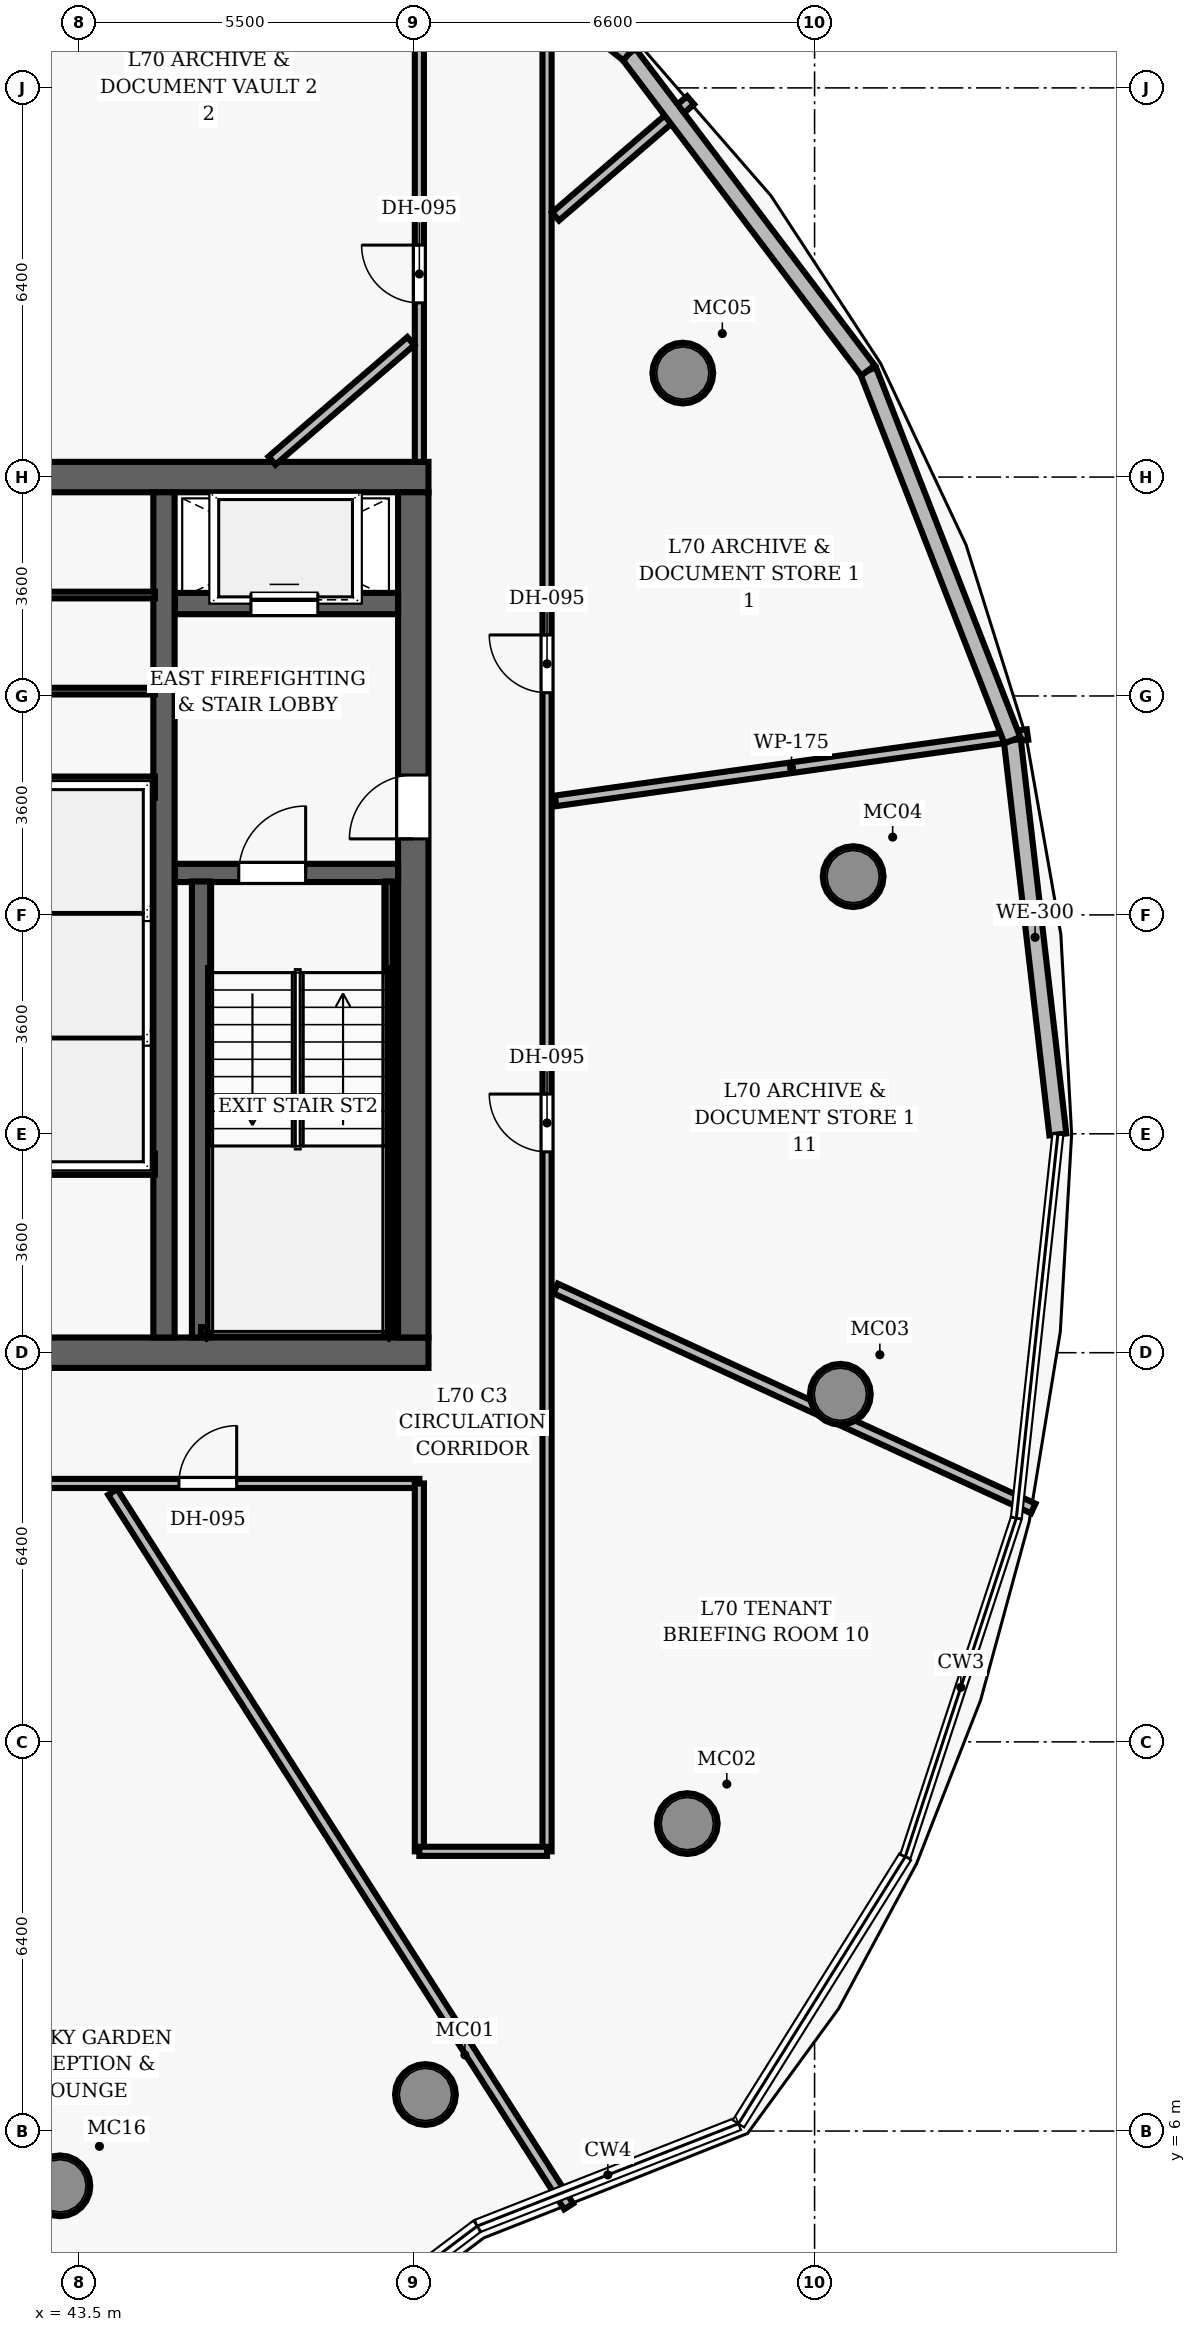
"""IFC4 building model, lengths in metres.
Left out: names, types, materials, properties, quantities, classifications, styles, units other than length and angle.
Written with IfcOpenShell. Run it as: python <this file> out.ifc"""

import sys

from ifc_helpers import new_model, si_unit, direction, frame, frame_2d, origin, origin_2d, place, context, subcontext, project, spatial, rectangle, hollow_circle, extrude, element, fill, save


model = new_model("IFC4")
c1 = context("Model", 3, precision=1e-05, world=origin(), true_north=direction((0.0, 1.0)))
c2 = subcontext(c1, "Body", "Model", "MODEL_VIEW")
j1 = project(units=[si_unit("LENGTHUNIT", "METRE"), si_unit("PLANEANGLEUNIT", "RADIAN")], contexts=[c1])
p1 = place(None, origin())
s1 = spatial("IfcSite", under=j1, at=p1, CompositionType="ELEMENT")
p2 = place(p1, origin())
s2 = spatial("IfcBuilding", under=s1, at=p2, CompositionType="ELEMENT")
p3 = place(p2, frame((0.0, 0.0, 276.7)))
s3 = spatial("IfcBuildingStorey", under=s2, at=p3, CompositionType="ELEMENT", Elevation=276.7)
p4 = place(p3, frame((26.75, 18.8, 0.0), z_axis=(0.0, 0.0, 1.0), x_axis=(1.0, 0.0, 0.0)))
e1 = element("IfcWall", 1, at=p4, inside=s3, PredefinedType="SHEAR", context=c2, shape_type="SweptSolid", body=[
    extrude(rectangle(XDim=22.5, YDim=0.5, at=frame_2d((11.25, 0.0))), origin(), (0.0, 0.0, 1.0), 3.85),
])
p5 = place(p4, frame((14.47, 0.0, 0.0)))
e2 = element("IfcOpeningElement", 2, at=p5, cuts=e1, PredefinedType="OPENING", context=c2, shape_type="SweptSolid", body=[
    extrude(rectangle(XDim=1.05, YDim=2.15, at=frame_2d((0.525, 1.075))), frame((0.0, 0.26, 0.0), z_axis=(0.0, -1.0, 0.0), x_axis=(1.0, 0.0, 0.0)), (0.0, 0.0, 1.0), 0.52),
])
p6 = place(p3, frame((26.75, 33.2, 0.0), z_axis=(0.0, 0.0, 1.0), x_axis=(1.0, 0.0, 0.0)))
e3 = element("IfcWall", 3, at=p6, inside=s3, PredefinedType="SHEAR", context=c2, shape_type="SweptSolid", body=[
    extrude(rectangle(XDim=22.5, YDim=0.5, at=frame_2d((11.25, 0.0))), origin(), (0.0, 0.0, 1.0), 3.85),
])
p7 = place(p3, frame((49.0, 19.05, 0.0), z_axis=(0.0, 0.0, 1.0), x_axis=(0.0, 1.0, 0.0)))
e4 = element("IfcWall", 4, at=p7, inside=s3, PredefinedType="SHEAR", context=c2, shape_type="SweptSolid", body=[
    extrude(rectangle(XDim=13.9, YDim=0.5, at=frame_2d((6.95, 0.0))), origin(), (0.0, 0.0, 1.0), 3.85),
])
p8 = place(p7, frame((8.2, 0.0, 0.0)))
e5 = element("IfcOpeningElement", 5, at=p8, cuts=e4, PredefinedType="OPENING", context=c2, shape_type="SweptSolid", body=[
    extrude(rectangle(XDim=1.05, YDim=2.15, at=frame_2d((0.525, 1.075))), frame((0.0, 0.26, 0.0), z_axis=(0.0, -1.0, 0.0), x_axis=(1.0, 0.0, 0.0)), (0.0, 0.0, 1.0), 0.52),
])
p9 = place(p3, frame((44.9, 19.05, 0.0), z_axis=(0.0, 0.0, 1.0), x_axis=(0.0, 1.0, 0.0)))
e6 = element("IfcWall", 6, at=p9, inside=s3, PredefinedType="SHEAR", context=c2, shape_type="SweptSolid", body=[
    extrude(rectangle(XDim=13.9, YDim=0.35, at=frame_2d((6.95, 0.0))), origin(), (0.0, 0.0, 1.0), 3.85),
])
for number, where, z_axis, x_axis in (
    (7, (49.2, 6.601, 0.0), (0.0, 0.0, 1.0), (1.0, 0.0, 0.0)),
    (8, (53.506, 11.056, 0.0), (0.0, 0.0, 1.0), (1.0, 0.0, 0.0)),
    (9, (56.024, 18.116, 0.0), (0.0, 0.0, 1.0), (1.0, 0.0, 0.0)),
    (10, (56.235, 26.629, 0.0), (0.0, 0.0, 1.0), (1.0, 0.0, 0.0)),
    (11, (53.433, 34.91, 0.0), (0.0, 0.0, 1.0), (1.0, 0.0, 0.0)),
    (12, (43.188, 5.099, 0.0), (0.0, 0.0, 1.0), (1.0, 0.0, 0.0)),
):
    element("IfcColumn", number, at=place(p3, frame(where, z_axis=z_axis, x_axis=x_axis)), inside=s3, PredefinedType="COLUMN", context=c2, shape_type="SweptSolid", body=[
        extrude(hollow_circle(Radius=0.5, WallThickness=0.045, at=origin_2d()), origin(), (0.0, 0.0, 1.0), 3.85),
    ])
p10 = place(p3, frame((45.08, 26.69, 0.0), z_axis=(0.0, 0.0, 1.0), x_axis=(1.0, 0.0, 0.0)))
e13 = element("IfcWall", 13, at=p10, inside=s3, PredefinedType="SHEAR", context=c2, shape_type="SweptSolid", body=[
    extrude(rectangle(XDim=3.67, YDim=0.3, at=frame_2d((1.835, 0.0))), origin(), (0.0, 0.0, 1.0), 3.85),
])
p11 = place(p10, frame((1.05, 0.0, 0.0)))
e14 = element("IfcOpeningElement", 14, at=p11, cuts=e13, PredefinedType="OPENING", context=c2, shape_type="SweptSolid", body=[
    extrude(rectangle(XDim=1.1, YDim=2.15, at=frame_2d((0.55, 1.075))), frame((0.0, 0.16, 0.0), z_axis=(0.0, -1.0, 0.0), x_axis=(1.0, 0.0, 0.0)), (0.0, 0.0, 1.0), 0.32),
])
p12 = place(p3, frame((45.51, 19.05, 0.0), z_axis=(0.0, 0.0, 1.0), x_axis=(0.0, 1.0, 0.0)))
e15 = element("IfcWall", 15, at=p12, inside=s3, PredefinedType="SHEAR", context=c2, shape_type="SweptSolid", body=[
    extrude(rectangle(XDim=7.5, YDim=0.3, at=frame_2d((3.75, 0.0))), origin(), (0.0, 0.0, 1.0), 3.85),
])
p13 = place(p3, frame((48.605, 19.1, 0.0), z_axis=(0.0, 0.0, 1.0), x_axis=(0.0, 1.0, 0.0)))
e16 = element("IfcWall", 16, at=p13, inside=s3, PredefinedType="SHEAR", context=c2, shape_type="SweptSolid", body=[
    extrude(rectangle(XDim=7.45, YDim=0.12, at=frame_2d((3.725, 0.0))), origin(), (0.0, 0.0, 1.0), 3.85),
])
p14 = place(p3, frame((45.51, 19.16, 0.0), z_axis=(0.0, 0.0, 1.0), x_axis=(1.0, 0.0, 0.0)))
e17 = element("IfcWall", 17, at=p14, inside=s3, PredefinedType="SHEAR", context=c2, shape_type="SweptSolid", body=[
    extrude(rectangle(XDim=3.095, YDim=0.12, at=frame_2d((1.547, 0.0))), origin(), (0.0, 0.0, 1.0), 3.85),
])
p15 = place(p3, frame((45.08, 31.12, 0.0), z_axis=(0.0, 0.0, 1.0), x_axis=(1.0, 0.0, 0.0)))
e18 = element("IfcWall", 18, at=p15, inside=s3, PredefinedType="SHEAR", context=c2, shape_type="SweptSolid", body=[
    extrude(rectangle(XDim=3.67, YDim=0.35, at=frame_2d((1.835, 0.0))), origin(), (0.0, 0.0, 1.0), 3.04),
])
p16 = place(p15, frame((1.25, 0.0, 0.0)))
e19 = element("IfcOpeningElement", 19, at=p16, cuts=e18, PredefinedType="OPENING", context=c2, shape_type="SweptSolid", body=[
    extrude(rectangle(XDim=1.1, YDim=2.15, at=frame_2d((0.55, 1.075))), frame((0.0, 0.185, 0.0), z_axis=(0.0, -1.0, 0.0), x_axis=(1.0, 0.0, 0.0)), (0.0, 0.0, 1.0), 0.37),
])
for number, where, z_axis, x_axis in (
    (20, (42.72, 21.9, 0.0), (0.0, 0.0, 1.0), (1.0, 0.0, 0.0)),
    (21, (42.72, 28.1, 0.0), (0.0, 0.0, 1.0), (1.0, 0.0, 0.0)),
):
    element("IfcWall", number, at=place(p3, frame(where, z_axis=z_axis, x_axis=x_axis)), inside=s3, PredefinedType="SHEAR", context=c2, shape_type="SweptSolid", body=[
        extrude(rectangle(XDim=2.03, YDim=0.35, at=frame_2d((1.015, 0.0))), origin(), (0.0, 0.0, 1.0), 3.04),
    ])
for number, where, z_axis, x_axis in (
    (22, (42.55, 29.68, 0.0), (0.0, 0.0, 1.0), (1.0, 0.0, 0.0)),
    (23, (42.55, 31.26, 0.0), (0.0, 0.0, 1.0), (1.0, 0.0, 0.0)),
):
    element("IfcWall", number, at=place(p3, frame(where, z_axis=z_axis, x_axis=x_axis)), inside=s3, PredefinedType="PARTITIONING", context=c2, shape_type="SweptSolid", body=[
        extrude(rectangle(XDim=2.2, YDim=0.11, at=frame_2d((1.1, 0.0))), origin(), (0.0, 0.0, 1.0), 3.04),
    ])
p17 = place(p3, frame((26.9, 16.65, 0.0), z_axis=(0.0, 0.0, 1.0), x_axis=(1.0, 0.0, 0.0)))
e24 = element("IfcWall", 24, at=p17, inside=s3, PredefinedType="PARTITIONING", context=c2, shape_type="SweptSolid", body=[
    extrude(rectangle(XDim=22.2, YDim=0.15, at=frame_2d((11.1, 0.0))), origin(), (0.0, 0.0, 1.0), 3.04),
])
p18 = place(p17, frame((9.217, 0.0, 0.0)))
e25 = element("IfcOpeningElement", 25, at=p18, cuts=e24, PredefinedType="OPENING", context=c2, shape_type="SweptSolid", body=[
    extrude(rectangle(XDim=0.95, YDim=2.15, at=frame_2d((0.475, 1.075))), frame((0.0, 0.085, 0.0), z_axis=(0.0, -1.0, 0.0), x_axis=(1.0, 0.0, 0.0)), (0.0, 0.0, 1.0), 0.17),
])
p19 = place(p17, frame((14.636, 0.0, 0.0)))
e26 = element("IfcOpeningElement", 26, at=p19, cuts=e24, PredefinedType="OPENING", context=c2, shape_type="SweptSolid", body=[
    extrude(rectangle(XDim=0.95, YDim=2.15, at=frame_2d((0.475, 1.075))), frame((0.0, 0.085, 0.0), z_axis=(0.0, -1.0, 0.0), x_axis=(1.0, 0.0, 0.0)), (0.0, 0.0, 1.0), 0.17),
])
p20 = place(p17, frame((18.246, 0.0, 0.0)))
e27 = element("IfcOpeningElement", 27, at=p20, cuts=e24, PredefinedType="OPENING", context=c2, shape_type="SweptSolid", body=[
    extrude(rectangle(XDim=0.95, YDim=2.15, at=frame_2d((0.475, 1.075))), frame((0.0, 0.085, 0.0), z_axis=(0.0, -1.0, 0.0), x_axis=(1.0, 0.0, 0.0)), (0.0, 0.0, 1.0), 0.17),
])
p21 = place(p3, frame((51.2, 10.6, 0.0), z_axis=(0.0, 0.0, 1.0), x_axis=(0.0, 1.0, 0.0)))
e28 = element("IfcWall", 28, at=p21, inside=s3, PredefinedType="PARTITIONING", context=c2, shape_type="SweptSolid", body=[
    extrude(rectangle(XDim=30.156, YDim=0.15, at=frame_2d((15.078, 0.0))), origin(), (0.0, 0.0, 1.0), 3.04),
])
p22 = place(p21, frame((19.053, 0.0, 0.0)))
e29 = element("IfcOpeningElement", 29, at=p22, cuts=e28, PredefinedType="OPENING", context=c2, shape_type="SweptSolid", body=[
    extrude(rectangle(XDim=0.95, YDim=2.15, at=frame_2d((0.475, 1.075))), frame((0.0, 0.085, 0.0), z_axis=(0.0, -1.0, 0.0), x_axis=(1.0, 0.0, 0.0)), (0.0, 0.0, 1.0), 0.17),
])
p23 = place(p21, frame((11.504, 0.0, 0.0)))
e30 = element("IfcOpeningElement", 30, at=p23, cuts=e28, PredefinedType="OPENING", context=c2, shape_type="SweptSolid", body=[
    extrude(rectangle(XDim=0.95, YDim=2.15, at=frame_2d((0.475, 1.075))), frame((0.0, 0.085, 0.0), z_axis=(0.0, -1.0, 0.0), x_axis=(1.0, 0.0, 0.0)), (0.0, 0.0, 1.0), 0.17),
])
p24 = place(p3, frame((49.1, 10.6, 0.0), z_axis=(0.0, 0.0, 1.0), x_axis=(0.0, 1.0, 0.0)))
e31 = element("IfcWall", 31, at=p24, inside=s3, PredefinedType="PARTITIONING", context=c2, shape_type="SweptSolid", body=[
    extrude(rectangle(XDim=6.05, YDim=0.15, at=frame_2d((3.025, 0.0))), origin(), (0.0, 0.0, 1.0), 3.04),
])
p25 = place(p3, frame((49.1, 33.45, 0.0), z_axis=(0.0, 0.0, 1.0), x_axis=(0.0, 1.0, 0.0)))
e32 = element("IfcWall", 32, at=p25, inside=s3, PredefinedType="PARTITIONING", context=c2, shape_type="SweptSolid", body=[
    extrude(rectangle(XDim=7.306, YDim=0.15, at=frame_2d((3.653, 0.0))), origin(), (0.0, 0.0, 1.0), 3.04),
])
p26 = place(p25, frame((2.615, 0.0, 0.0)))
e33 = element("IfcOpeningElement", 33, at=p26, cuts=e32, PredefinedType="OPENING", context=c2, shape_type="SweptSolid", body=[
    extrude(rectangle(XDim=0.95, YDim=2.15, at=frame_2d((0.475, 1.075))), frame((0.0, 0.085, 0.0), z_axis=(0.0, -1.0, 0.0), x_axis=(1.0, 0.0, 0.0)), (0.0, 0.0, 1.0), 0.17),
])
p27 = place(p3, frame((49.1, 10.6, 0.0), z_axis=(0.0, 0.0, 1.0), x_axis=(1.0, 0.0, 0.0)))
e34 = element("IfcWall", 34, at=p27, inside=s3, PredefinedType="PARTITIONING", context=c2, shape_type="SweptSolid", body=[
    extrude(rectangle(XDim=2.1, YDim=0.15, at=frame_2d((1.05, 0.0))), origin(), (0.0, 0.0, 1.0), 3.04),
])
p28 = place(p3, frame((51.34, 27.875, 0.0), z_axis=(0.0, 0.0, 1.0), x_axis=(0.990267180632, 0.13917942004, 0.0)))
e35 = element("IfcWall", 35, at=p28, inside=s3, PredefinedType="PARTITIONING", context=c2, shape_type="SweptSolid", body=[
    extrude(rectangle(XDim=7.837, YDim=0.175, at=frame_2d((3.919, 0.0))), origin(), (0.0, 0.0, 1.0), 3.04),
])
p29 = place(p3, frame((46.676, 33.47, 0.0), z_axis=(0.0, 0.0, 1.0), x_axis=(0.757802183171, 0.652484368534, 0.0)))
e36 = element("IfcWall", 36, at=p29, inside=s3, PredefinedType="PARTITIONING", context=c2, shape_type="SweptSolid", body=[
    extrude(rectangle(XDim=3.014, YDim=0.175, at=frame_2d((1.507, 0.0))), origin(), (0.0, 0.0, 1.0), 3.04),
])
p30 = place(p3, frame((51.34, 37.485, 0.0), z_axis=(0.0, 0.0, 1.0), x_axis=(0.757854651691, 0.65242342609, 0.0)))
e37 = element("IfcWall", 37, at=p30, inside=s3, PredefinedType="PARTITIONING", context=c2, shape_type="SweptSolid", body=[
    extrude(rectangle(XDim=2.929, YDim=0.175, at=frame_2d((1.465, 0.0))), origin(), (0.0, 0.0, 1.0), 3.04),
])
p31 = place(p3, frame((40.219, 33.47, 0.0), z_axis=(0.0, 0.0, 1.0), x_axis=(0.284761265489, 0.958598467387, 0.0)))
e38 = element("IfcWall", 38, at=p31, inside=s3, PredefinedType="PARTITIONING", context=c2, shape_type="SweptSolid", body=[
    extrude(rectangle(XDim=13.315, YDim=0.175, at=frame_2d((6.657, 0.0))), origin(), (0.0, 0.0, 1.0), 3.04),
])
p32 = place(p3, frame((44.056, 16.51, 0.0), z_axis=(0.0, 0.0, 1.0), x_axis=(0.537968724739, -0.842964798318, 0.0)))
e39 = element("IfcWall", 39, at=p32, inside=s3, PredefinedType="PARTITIONING", context=c2, shape_type="SweptSolid", body=[
    extrude(rectangle(XDim=13.939, YDim=0.175, at=frame_2d((6.969, 0.0))), origin(), (0.0, 0.0, 1.0), 3.04),
])
p33 = place(p3, frame((51.34, 19.857, 0.0), z_axis=(0.0, 0.0, 1.0), x_axis=(0.908301951137, -0.418315151005, 0.0)))
e40 = element("IfcWall", 40, at=p33, inside=s3, PredefinedType="PARTITIONING", context=c2, shape_type="SweptSolid", body=[
    extrude(rectangle(XDim=8.649, YDim=0.175, at=frame_2d((4.324, 0.0))), origin(), (0.0, 0.0, 1.0), 3.04),
])
p34 = place(p3, frame((58.852, 28.873, 0.0), z_axis=(0.0, 0.0, 1.0), x_axis=(0.114807272094, -0.99338778444, 0.0)))
e41 = element("IfcWall", 41, at=p34, inside=s3, PredefinedType="SOLIDWALL", context=c2, shape_type="SweptSolid", body=[
    extrude(rectangle(XDim=6.526, YDim=0.28, at=frame_2d((3.263, 0.0))), origin(), (0.0, 0.0, 1.0), 3.625),
])
p35 = place(p3, frame((56.479, 34.953, 0.0), z_axis=(0.0, 0.0, 1.0), x_axis=(0.363541693905, -0.931577928459, 0.0)))
e42 = element("IfcWall", 42, at=p35, inside=s3, PredefinedType="SOLIDWALL", context=c2, shape_type="SweptSolid", body=[
    extrude(rectangle(XDim=6.527, YDim=0.28, at=frame_2d((3.263, 0.0))), origin(), (0.0, 0.0, 1.0), 3.625),
])
p36 = place(p3, frame((52.543, 40.16, 0.0), z_axis=(0.0, 0.0, 1.0), x_axis=(0.602964309208, -0.797768162953, 0.0)))
e43 = element("IfcWall", 43, at=p36, inside=s3, PredefinedType="SOLIDWALL", context=c2, shape_type="SweptSolid", body=[
    extrude(rectangle(XDim=6.527, YDim=0.28, at=frame_2d((3.264, 0.0))), origin(), (0.0, 0.0, 1.0), 3.625),
])
p37 = place(p3, frame((47.414, 44.195, 0.0), z_axis=(0.0, 0.0, 1.0), x_axis=(0.785937839429, -0.618305517163, 0.0)))
e44 = element("IfcWall", 44, at=p37, inside=s3, PredefinedType="SOLIDWALL", context=c2, shape_type="SweptSolid", body=[
    extrude(rectangle(XDim=6.526, YDim=0.28, at=frame_2d((3.263, 0.0))), origin(), (0.0, 0.0, 1.0), 3.625),
])
p38 = place(p11, origin())
e45 = element("IfcDoor", 45, at=p38, inside=s3, OperationType="SINGLE_SWING_RIGHT", PredefinedType="DOOR", context=c2, shape_type="SweptSolid", body=[
    extrude(rectangle(XDim=1.1, YDim=2.15, at=frame_2d((0.55, 1.075))), frame((0.0, 0.025, 0.0), z_axis=(0.0, -1.0, 0.0), x_axis=(1.0, 0.0, 0.0)), (0.0, 0.0, 1.0), 0.05),
])
fill(e14, e45)
p39 = place(p8, origin())
e46 = element("IfcDoor", 46, at=p39, inside=s3, OperationType="SINGLE_SWING_LEFT", PredefinedType="DOOR", context=c2, shape_type="SweptSolid", body=[
    extrude(rectangle(XDim=1.05, YDim=2.15, at=frame_2d((0.525, 1.075))), frame((0.0, 0.025, 0.0), z_axis=(0.0, -1.0, 0.0), x_axis=(1.0, 0.0, 0.0)), (0.0, 0.0, 1.0), 0.05),
])
fill(e5, e46)
p40 = place(p22, origin())
e47 = element("IfcDoor", 47, at=p40, inside=s3, OperationType="SINGLE_SWING_RIGHT", PredefinedType="DOOR", context=c2, shape_type="SweptSolid", body=[
    extrude(rectangle(XDim=0.95, YDim=2.15, at=frame_2d((0.475, 1.075))), frame((0.0, 0.025, 0.0), z_axis=(0.0, -1.0, 0.0), x_axis=(1.0, 0.0, 0.0)), (0.0, 0.0, 1.0), 0.05),
])
fill(e29, e47)
p41 = place(p26, origin())
e48 = element("IfcDoor", 48, at=p41, inside=s3, OperationType="SINGLE_SWING_RIGHT", PredefinedType="DOOR", context=c2, shape_type="SweptSolid", body=[
    extrude(rectangle(XDim=0.95, YDim=2.15, at=frame_2d((0.475, 1.075))), frame((0.0, 0.025, 0.0), z_axis=(0.0, -1.0, 0.0), x_axis=(1.0, 0.0, 0.0)), (0.0, 0.0, 1.0), 0.05),
])
fill(e33, e48)
p42 = place(p20, origin())
e49 = element("IfcDoor", 49, at=p42, inside=s3, OperationType="SINGLE_SWING_RIGHT", PredefinedType="DOOR", context=c2, shape_type="SweptSolid", body=[
    extrude(rectangle(XDim=0.95, YDim=2.15, at=frame_2d((0.475, 1.075))), frame((0.0, 0.025, 0.0), z_axis=(0.0, -1.0, 0.0), x_axis=(1.0, 0.0, 0.0)), (0.0, 0.0, 1.0), 0.05),
])
fill(e27, e49)
p43 = place(p23, origin())
e50 = element("IfcDoor", 50, at=p43, inside=s3, OperationType="SINGLE_SWING_RIGHT", PredefinedType="DOOR", context=c2, shape_type="SweptSolid", body=[
    extrude(rectangle(XDim=0.95, YDim=2.15, at=frame_2d((0.475, 1.075))), frame((0.0, 0.025, 0.0), z_axis=(0.0, -1.0, 0.0), x_axis=(1.0, 0.0, 0.0)), (0.0, 0.0, 1.0), 0.05),
])
fill(e30, e50)
p44 = place(p16, origin())
e51 = element("IfcDoor", 51, at=p44, inside=s3, OperationType="SLIDING_TO_LEFT", PredefinedType="DOOR", context=c2, shape_type="SweptSolid", body=[
    extrude(rectangle(XDim=1.1, YDim=2.15, at=frame_2d((0.55, 1.075))), frame((0.0, 0.025, 0.0), z_axis=(0.0, -1.0, 0.0), x_axis=(1.0, 0.0, 0.0)), (0.0, 0.0, 1.0), 0.05),
])
fill(e19, e51)
save(model, sys.argv[1])
